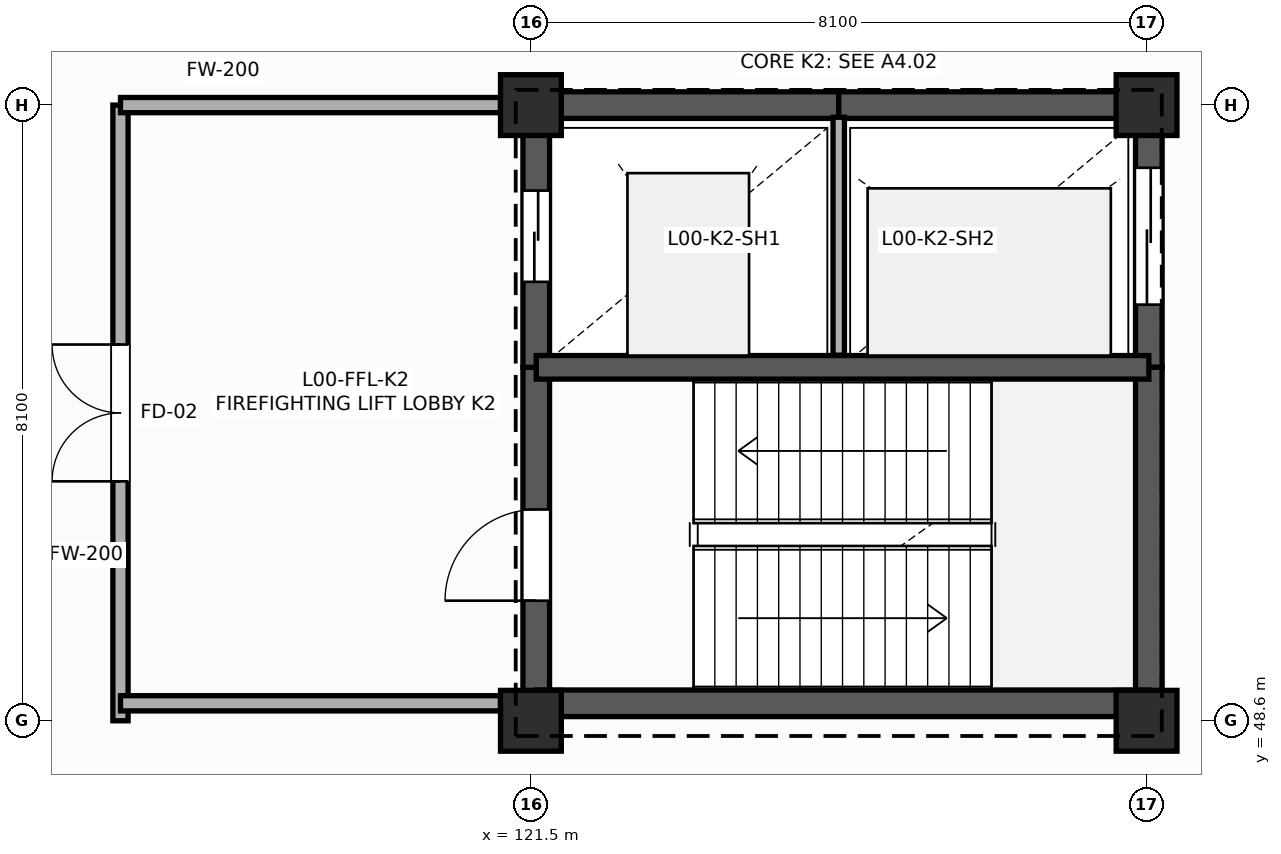
"""IFC4 building model, lengths in metres.
Left out: names, types, materials, properties, quantities, classifications, styles, units other than length and angle.
Written with IfcOpenShell. Run it as: python <this file> out.ifc"""

import sys

from ifc_helpers import new_model, si_unit, direction, frame, frame_2d, origin, origin_2d, place, context, subcontext, project, spatial, rectangle, extrude, element, fill, save


model = new_model("IFC4")
c1 = context("Model", 3, precision=1e-05, world=origin(), true_north=direction((0.0, 1.0)))
c2 = subcontext(c1, "Body", "Model", "MODEL_VIEW")
j1 = project(units=[si_unit("LENGTHUNIT", "METRE"), si_unit("PLANEANGLEUNIT", "RADIAN")], contexts=[c1])
p1 = place(None, origin())
s1 = spatial("IfcSite", under=j1, at=p1, CompositionType="ELEMENT")
p2 = place(p1, origin())
s2 = spatial("IfcBuilding", under=s1, at=p2, CompositionType="ELEMENT")
p3 = place(p2, origin())
s3 = spatial("IfcBuildingStorey", under=s2, at=p3, CompositionType="ELEMENT", Elevation=0.0)
for number, where, z_axis, x_axis in (
    (1, (121.5, 48.6, 0.0), (0.0, 0.0, 1.0), (1.0, 0.0, 0.0)),
    (2, (121.5, 56.7, 0.0), (0.0, 0.0, 1.0), (1.0, 0.0, 0.0)),
    (3, (129.6, 48.6, 0.0), (0.0, 0.0, 1.0), (1.0, 0.0, 0.0)),
    (4, (129.6, 56.7, 0.0), (0.0, 0.0, 1.0), (1.0, 0.0, 0.0)),
):
    element("IfcColumn", number, at=place(p3, frame(where, z_axis=z_axis, x_axis=x_axis)), inside=s3, PredefinedType="COLUMN", context=c2, shape_type="SweptSolid", body=[
        extrude(rectangle(XDim=0.8, YDim=0.8, at=origin_2d()), origin(), (0.0, 0.0, 1.0), 5.4),
    ])
p4 = place(p3, frame((121.57, 48.83, 0.0), z_axis=(0.0, 0.0, 1.0), x_axis=(0.0, 1.0, 0.0)))
e5 = element("IfcWall", 5, at=p4, inside=s3, PredefinedType="SHEAR", context=c2, shape_type="SweptSolid", body=[
    extrude(rectangle(XDim=4.42, YDim=0.35, at=frame_2d((2.21, 0.0))), origin(), (0.0, 0.0, 1.0), 5.4),
])
p5 = place(p4, frame((1.35, 0.0, 0.0)))
e6 = element("IfcOpeningElement", 6, at=p5, cuts=e5, PredefinedType="OPENING", context=c2, shape_type="SweptSolid", body=[
    extrude(rectangle(XDim=1.2, YDim=2.25, at=frame_2d((0.6, 1.125))), frame((0.0, 0.185, 0.0), z_axis=(0.0, -1.0, 0.0), x_axis=(1.0, 0.0, 0.0)), (0.0, 0.0, 1.0), 0.37),
])
p6 = place(p3, frame((121.57, 53.25, 0.0), z_axis=(0.0, 0.0, 1.0), x_axis=(0.0, 1.0, 0.0)))
e7 = element("IfcWall", 7, at=p6, inside=s3, PredefinedType="SHEAR", context=c2, shape_type="SweptSolid", body=[
    extrude(rectangle(XDim=3.45, YDim=0.35, at=frame_2d((1.725, 0.0))), origin(), (0.0, 0.0, 1.0), 5.4),
])
p7 = place(p6, frame((1.125, 0.0, 0.0)))
e8 = element("IfcOpeningElement", 8, at=p7, cuts=e7, PredefinedType="OPENING", context=c2, shape_type="SweptSolid", body=[
    extrude(rectangle(XDim=1.2, YDim=2.2, at=frame_2d((0.6, 1.1))), frame((0.0, 0.185, 0.0), z_axis=(0.0, -1.0, 0.0), x_axis=(1.0, 0.0, 0.0)), (0.0, 0.0, 1.0), 0.37),
])
p8 = place(p3, frame((121.57, 56.7, 0.0), z_axis=(0.0, 0.0, 1.0), x_axis=(1.0, 0.0, 0.0)))
e9 = element("IfcWall", 9, at=p8, inside=s3, PredefinedType="SHEAR", context=c2, shape_type="SweptSolid", body=[
    extrude(rectangle(XDim=3.98, YDim=0.35, at=frame_2d((1.99, 0.0))), origin(), (0.0, 0.0, 1.0), 5.4),
])
p9 = place(p3, frame((125.55, 56.7, 0.0), z_axis=(0.0, 0.0, 1.0), x_axis=(1.0, 0.0, 0.0)))
e10 = element("IfcWall", 10, at=p9, inside=s3, PredefinedType="SHEAR", context=c2, shape_type="SweptSolid", body=[
    extrude(rectangle(XDim=4.08, YDim=0.35, at=frame_2d((2.04, 0.0))), origin(), (0.0, 0.0, 1.0), 5.4),
])
p10 = place(p3, frame((129.63, 56.7, 0.0), z_axis=(0.0, 0.0, 1.0), x_axis=(0.0, -1.0, 0.0)))
e11 = element("IfcWall", 11, at=p10, inside=s3, PredefinedType="SHEAR", context=c2, shape_type="SweptSolid", body=[
    extrude(rectangle(XDim=3.45, YDim=0.35, at=frame_2d((1.725, 0.0))), origin(), (0.0, 0.0, 1.0), 5.4),
])
p11 = place(p10, frame((0.825, 0.0, 0.0)))
e12 = element("IfcOpeningElement", 12, at=p11, cuts=e11, PredefinedType="OPENING", context=c2, shape_type="SweptSolid", body=[
    extrude(rectangle(XDim=1.8, YDim=2.4, at=frame_2d((0.9, 1.2))), frame((0.0, 0.185, 0.0), z_axis=(0.0, -1.0, 0.0), x_axis=(1.0, 0.0, 0.0)), (0.0, 0.0, 1.0), 0.37),
])
p12 = place(p3, frame((129.63, 53.25, 0.0), z_axis=(0.0, 0.0, 1.0), x_axis=(0.0, -1.0, 0.0)))
e13 = element("IfcWall", 13, at=p12, inside=s3, PredefinedType="SHEAR", context=c2, shape_type="SweptSolid", body=[
    extrude(rectangle(XDim=4.42, YDim=0.35, at=frame_2d((2.21, 0.0))), origin(), (0.0, 0.0, 1.0), 5.4),
])
p13 = place(p3, frame((129.63, 48.83, 0.0), z_axis=(0.0, 0.0, 1.0), x_axis=(-1.0, 0.0, 0.0)))
e14 = element("IfcWall", 14, at=p13, inside=s3, PredefinedType="SHEAR", context=c2, shape_type="SweptSolid", body=[
    extrude(rectangle(XDim=8.06, YDim=0.35, at=frame_2d((4.03, 0.0))), origin(), (0.0, 0.0, 1.0), 5.4),
])
p14 = place(p3, frame((121.57, 53.25, 0.0), z_axis=(0.0, 0.0, 1.0), x_axis=(1.0, 0.0, 0.0)))
e15 = element("IfcWall", 15, at=p14, inside=s3, PredefinedType="SHEAR", context=c2, shape_type="SweptSolid", body=[
    extrude(rectangle(XDim=8.06, YDim=0.31, at=frame_2d((4.03, 0.0))), origin(), (0.0, 0.0, 1.0), 5.4),
])
p15 = place(p3, frame((125.55, 53.41, 0.0), z_axis=(0.0, 0.0, 1.0), x_axis=(0.0, 1.0, 0.0)))
e16 = element("IfcWall", 16, at=p15, inside=s3, PredefinedType="PLUMBINGWALL", context=c2, shape_type="SweptSolid", body=[
    extrude(rectangle(XDim=3.13, YDim=0.15, at=frame_2d((1.565, 0.0))), origin(), (0.0, 0.0, 1.0), 5.05),
])
p16 = place(p3, frame((116.1, 48.6, 0.0), z_axis=(0.0, 0.0, 1.0), x_axis=(0.0, 1.0, 0.0)))
e17 = element("IfcWall", 17, at=p16, inside=s3, PredefinedType="PARTITIONING", context=c2, shape_type="SweptSolid", body=[
    extrude(rectangle(XDim=8.1, YDim=0.2, at=frame_2d((4.05, 0.0))), origin(), (0.0, 0.0, 1.0), 5.1),
])
p17 = place(p16, frame((3.15, 0.0, 0.0)))
e18 = element("IfcOpeningElement", 18, at=p17, cuts=e17, PredefinedType="OPENING", context=c2, shape_type="SweptSolid", body=[
    extrude(rectangle(XDim=1.8, YDim=2.25, at=frame_2d((0.9, 1.125))), frame((0.0, 0.11, 0.0), z_axis=(0.0, -1.0, 0.0), x_axis=(1.0, 0.0, 0.0)), (0.0, 0.0, 1.0), 0.22),
])
p18 = place(p3, frame((116.1, 56.7, 0.0), z_axis=(0.0, 0.0, 1.0), x_axis=(1.0, 0.0, 0.0)))
e19 = element("IfcWall", 19, at=p18, inside=s3, PredefinedType="PARTITIONING", context=c2, shape_type="SweptSolid", body=[
    extrude(rectangle(XDim=5.0, YDim=0.2, at=frame_2d((2.5, 0.0))), origin(), (0.0, 0.0, 1.0), 4.516),
])
p19 = place(p3, frame((121.1, 48.83, 0.0), z_axis=(0.0, 0.0, 1.0), x_axis=(-1.0, 0.0, 0.0)))
e20 = element("IfcWall", 20, at=p19, inside=s3, PredefinedType="PARTITIONING", context=c2, shape_type="SweptSolid", body=[
    extrude(rectangle(XDim=5.0, YDim=0.2, at=frame_2d((2.5, 0.0))), origin(), (0.0, 0.0, 1.0), 4.58),
])
p20 = place(p5, origin())
e21 = element("IfcDoor", 21, at=p20, inside=s3, OperationType="SINGLE_SWING_LEFT", PredefinedType="DOOR", context=c2, shape_type="SweptSolid", body=[
    extrude(rectangle(XDim=1.2, YDim=2.25, at=frame_2d((0.6, 1.125))), frame((0.0, 0.025, 0.0), z_axis=(0.0, -1.0, 0.0), x_axis=(1.0, 0.0, 0.0)), (0.0, 0.0, 1.0), 0.05),
])
fill(e6, e21)
p21 = place(p7, origin())
e22 = element("IfcDoor", 22, at=p21, inside=s3, OperationType="SLIDING_TO_LEFT", PredefinedType="DOOR", context=c2, shape_type="SweptSolid", body=[
    extrude(rectangle(XDim=1.2, YDim=2.2, at=frame_2d((0.6, 1.1))), frame((0.0, 0.025, 0.0), z_axis=(0.0, -1.0, 0.0), x_axis=(1.0, 0.0, 0.0)), (0.0, 0.0, 1.0), 0.05),
])
fill(e8, e22)
p22 = place(p11, origin())
e23 = element("IfcDoor", 23, at=p22, inside=s3, OperationType="SLIDING_TO_LEFT", PredefinedType="DOOR", context=c2, shape_type="SweptSolid", body=[
    extrude(rectangle(XDim=1.8, YDim=2.4, at=frame_2d((0.9, 1.2))), frame((0.0, 0.025, 0.0), z_axis=(0.0, -1.0, 0.0), x_axis=(1.0, 0.0, 0.0)), (0.0, 0.0, 1.0), 0.05),
])
fill(e12, e23)
p23 = place(p17, origin())
e24 = element("IfcDoor", 24, at=p23, inside=s3, OperationType="DOUBLE_DOOR_SINGLE_SWING", PredefinedType="DOOR", context=c2, shape_type="SweptSolid", body=[
    extrude(rectangle(XDim=1.8, YDim=2.25, at=frame_2d((0.9, 1.125))), frame((0.0, 0.025, 0.0), z_axis=(0.0, -1.0, 0.0), x_axis=(1.0, 0.0, 0.0)), (0.0, 0.0, 1.0), 0.05),
])
fill(e18, e24)
save(model, sys.argv[1])
